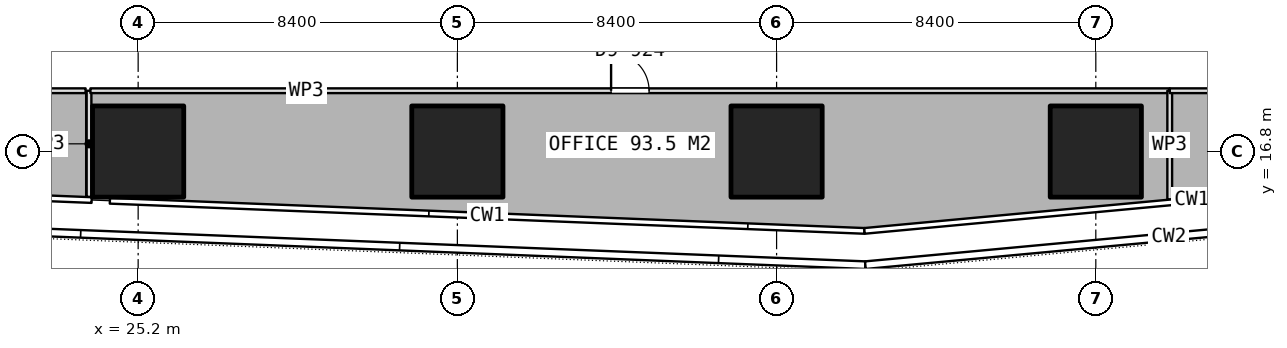
"""IFC4 building model, lengths in metres.
Left out: names, types, materials, properties, quantities, classifications, styles, units other than length and angle.
Written with IfcOpenShell. Run it as: python <this file> out.ifc"""

import sys

from ifc_helpers import new_model, si_unit, direction, frame, frame_2d, origin, origin_2d, place, context, subcontext, project, spatial, rectangle, extrude, element, fill, save


model = new_model("IFC4")
c1 = context("Model", 3, precision=1e-05, world=origin(), true_north=direction((0.0, 1.0)))
c2 = subcontext(c1, "Body", "Model", "MODEL_VIEW")
j1 = project(units=[si_unit("LENGTHUNIT", "METRE"), si_unit("PLANEANGLEUNIT", "RADIAN")], contexts=[c1])
p1 = place(None, origin())
s1 = spatial("IfcSite", under=j1, at=p1, CompositionType="ELEMENT")
p2 = place(p1, origin())
s2 = spatial("IfcBuilding", under=s1, at=p2, CompositionType="ELEMENT")
p3 = place(p2, frame((0.0, 0.0, 236.45)))
s3 = spatial("IfcBuildingStorey", under=s2, at=p3, CompositionType="ELEMENT", Elevation=236.45)
for number, where, z_axis, x_axis in (
    (1, (25.2, 16.8, 0.0), (0.0, 0.0, 1.0), (1.0, 0.0, 0.0)),
    (2, (33.6, 16.8, 0.0), (0.0, 0.0, 1.0), (1.0, 0.0, 0.0)),
    (3, (42.0, 16.8, 0.0), (0.0, 0.0, 1.0), (1.0, 0.0, 0.0)),
    (4, (50.4, 16.8, 0.0), (0.0, 0.0, 1.0), (1.0, 0.0, 0.0)),
):
    element("IfcColumn", number, at=place(p3, frame(where, z_axis=z_axis, x_axis=x_axis)), inside=s3, PredefinedType="COLUMN", context=c2, shape_type="SweptSolid", body=[
        extrude(rectangle(XDim=2.4, YDim=2.4, at=origin_2d()), origin(), (0.0, 0.0, 1.0), 3.75),
    ])
p4 = place(p3, frame((23.907, 15.606, 0.0), z_axis=(0.0, 0.0, 1.0), x_axis=(0.0, 1.0, 0.0)))
e5 = element("IfcWall", 5, at=p4, inside=s3, PredefinedType="PARTITIONING", context=c2, shape_type="SweptSolid", body=[
    extrude(rectangle(XDim=2.794, YDim=0.125, at=frame_2d((1.397, 0.0))), origin(), (0.0, 0.0, 1.0), 3.4),
])
p5 = place(p3, frame((23.944, 18.4, 0.0), z_axis=(0.0, 0.0, 1.0), x_axis=(1.0, 0.0, 0.0)))
e6 = element("IfcWall", 6, at=p5, inside=s3, PredefinedType="PARTITIONING", context=c2, shape_type="SweptSolid", body=[
    extrude(rectangle(XDim=28.401, YDim=0.125, at=frame_2d((14.2, 0.0))), origin(), (0.0, 0.0, 1.0), 3.4),
])
p6 = place(p5, frame((13.701, 0.0, 0.0)))
e7 = element("IfcOpeningElement", 7, at=p6, cuts=e6, PredefinedType="OPENING", context=c2, shape_type="SweptSolid", body=[
    extrude(rectangle(XDim=1.0, YDim=2.1, at=frame_2d((0.5, 1.05))), frame((0.0, 0.073, 0.0), z_axis=(0.0, -1.0, 0.0), x_axis=(1.0, 0.0, 0.0)), (0.0, 0.0, 1.0), 0.145),
])
p7 = place(p3, frame((52.345, 18.4, 0.0), z_axis=(0.0, 0.0, 1.0), x_axis=(0.0, -1.0, 0.0)))
e8 = element("IfcWall", 8, at=p7, inside=s3, PredefinedType="PARTITIONING", context=c2, shape_type="SweptSolid", body=[
    extrude(rectangle(XDim=2.86, YDim=0.125, at=frame_2d((1.43, 0.0))), origin(), (0.0, 0.0, 1.0), 3.4),
])
p8 = place(p3, frame((52.346, 18.4, 0.0), z_axis=(0.0, 0.0, 1.0), x_axis=(1.0, 0.0, 0.0)))
e9 = element("IfcWall", 9, at=p8, inside=s3, PredefinedType="PARTITIONING", context=c2, shape_type="SweptSolid", body=[
    extrude(rectangle(XDim=4.054, YDim=0.125, at=frame_2d((2.027, 0.0))), origin(), (0.0, 0.0, 1.0), 3.4),
])
p9 = place(p8, frame((1.527, 0.0, 0.0)))
e10 = element("IfcOpeningElement", 10, at=p9, cuts=e9, PredefinedType="OPENING", context=c2, shape_type="SweptSolid", body=[
    extrude(rectangle(XDim=1.0, YDim=2.1, at=frame_2d((0.5, 1.05))), frame((0.0, 0.073, 0.0), z_axis=(0.0, -1.0, 0.0), x_axis=(1.0, 0.0, 0.0)), (0.0, 0.0, 1.0), 0.145),
])
p10 = place(p3, frame((19.2, 18.4, 0.0), z_axis=(0.0, 0.0, 1.0), x_axis=(1.0, 0.0, 0.0)))
e11 = element("IfcWall", 11, at=p10, inside=s3, PredefinedType="PARTITIONING", context=c2, shape_type="SweptSolid", body=[
    extrude(rectangle(XDim=4.617, YDim=0.125, at=frame_2d((2.309, 0.0))), origin(), (0.0, 0.0, 1.0), 3.4),
])
p11 = place(p10, frame((1.808, 0.0, 0.0)))
e12 = element("IfcOpeningElement", 12, at=p11, cuts=e11, PredefinedType="OPENING", context=c2, shape_type="SweptSolid", body=[
    extrude(rectangle(XDim=1.0, YDim=2.1, at=frame_2d((0.5, 1.05))), frame((0.0, 0.073, 0.0), z_axis=(0.0, -1.0, 0.0), x_axis=(1.0, 0.0, 0.0)), (0.0, 0.0, 1.0), 0.145),
])
p12 = place(p6, origin())
e13 = element("IfcDoor", 13, at=p12, inside=s3, OperationType="SINGLE_SWING_LEFT", PredefinedType="DOOR", context=c2, shape_type="SweptSolid", body=[
    extrude(rectangle(XDim=1.0, YDim=2.1, at=frame_2d((0.5, 1.05))), frame((0.0, 0.025, 0.0), z_axis=(0.0, -1.0, 0.0), x_axis=(1.0, 0.0, 0.0)), (0.0, 0.0, 1.0), 0.05),
])
fill(e7, e13)
save(model, sys.argv[1])
